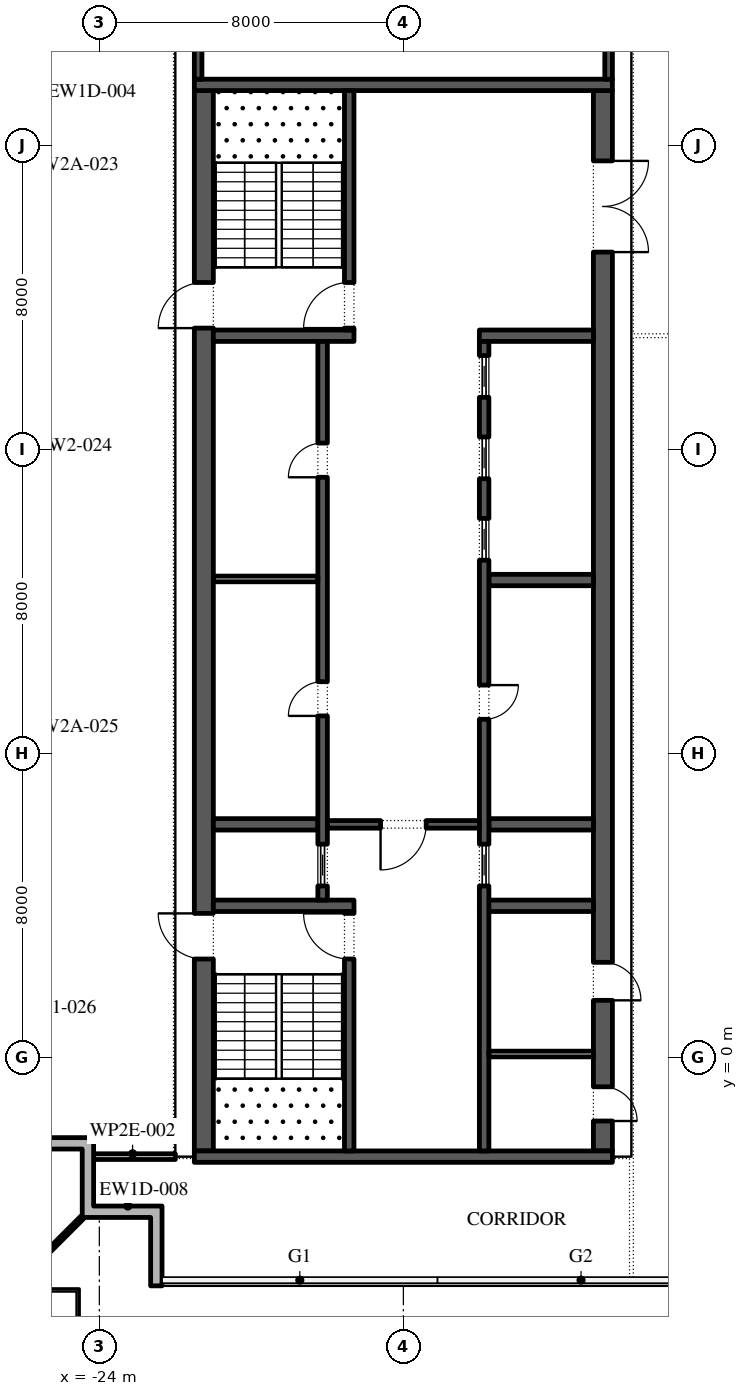
"""IFC4 building model, lengths in metres.
Left out: names, types, materials, properties, quantities, classifications, styles, units other than length and angle.
Written with IfcOpenShell. Run it as: python <this file> out.ifc"""

import sys

from ifc_helpers import new_model, si_unit, direction, frame, frame_2d, origin, place, context, subcontext, project, spatial, polyline, rectangle, outline, extrude, element, fill, save


model = new_model("IFC4")
c1 = context("Model", 3, precision=1e-05, world=origin(), true_north=direction((0.0, 1.0)))
c2 = subcontext(c1, "Body", "Model", "MODEL_VIEW")
j1 = project(units=[si_unit("LENGTHUNIT", "METRE"), si_unit("PLANEANGLEUNIT", "RADIAN")], contexts=[c1])
p1 = place(None, origin())
s1 = spatial("IfcSite", under=j1, at=p1, CompositionType="ELEMENT")
p2 = place(p1, origin())
s2 = spatial("IfcBuilding", under=s1, at=p2, CompositionType="ELEMENT")
p3 = place(p2, frame((0.0, 0.0, 359.4)))
s3 = spatial("IfcBuildingStorey", under=s2, at=p3, CompositionType="ELEMENT", Elevation=359.4)
p4 = place(p3, origin())
e1 = element("IfcWall", 1, at=p4, inside=s3, PredefinedType="STANDARD", context=c2, shape_type="SweptSolid", body=[
    extrude(outline(polyline([(-22.65, -4.2), (-24.45, -4.2), (-24.45, -2.4), (-25.95, -2.4), (-25.95, -2.1), (-24.15, -2.1), (-24.15, -3.9), (-22.35, -3.9), (-22.35, -6.0), (-22.65, -6.0), (-22.65, -4.2)])), origin(), (0.0, 0.0, 1.0), 3.9),
])
p5 = place(p3, frame((-24.45, -4.2, -0.05), z_axis=(0.0, 0.0, 1.0), x_axis=(-0.707106781187, -0.707106781187, 0.0)))
e2 = element("IfcWall", 2, at=p5, inside=s3, PredefinedType="STANDARD", context=c2, shape_type="SweptSolid", body=[
    extrude(rectangle(XDim=2.667, YDim=0.1, at=frame_2d((1.333, 0.0))), origin(), (0.0, 0.0, 1.0), 3.95),
])
p6 = place(p3, frame((-21.25, -2.45, 0.0), z_axis=(0.0, 0.0, 1.0), x_axis=(0.0, 1.0, 0.0)))
e3 = element("IfcWall", 3, at=p6, inside=s3, PredefinedType="SHEAR", context=c2, shape_type="SweptSolid", body=[
    extrude(rectangle(XDim=27.9, YDim=0.5, at=frame_2d((13.95, 0.0))), origin(), (0.0, 0.0, 1.0), 3.9),
])
p7 = place(p6, frame((5.05, 0.0, 0.0)))
e4 = element("IfcOpeningElement", 4, at=p7, cuts=e3, PredefinedType="OPENING", context=c2, shape_type="SweptSolid", body=[
    extrude(rectangle(XDim=1.2, YDim=2.1, at=frame_2d((0.6, 1.05))), frame((0.0, 0.26, 0.0), z_axis=(0.0, -1.0, 0.0), x_axis=(1.0, 0.0, 0.0)), (0.0, 0.0, 1.0), 0.52),
])
p8 = place(p6, frame((21.65, 0.0, 0.0)))
e5 = element("IfcOpeningElement", 5, at=p8, cuts=e3, PredefinedType="OPENING", context=c2, shape_type="SweptSolid", body=[
    extrude(rectangle(XDim=1.2, YDim=2.1, at=frame_2d((0.6, 1.05))), frame((0.0, 0.26, 0.0), z_axis=(0.0, -1.0, 0.0), x_axis=(1.0, 0.0, 0.0)), (0.0, 0.0, 1.0), 0.52),
])
p9 = place(p3, frame((-10.75, -2.45, 0.0), z_axis=(0.0, 0.0, 1.0), x_axis=(0.0, 1.0, 0.0)))
e6 = element("IfcWall", 6, at=p9, inside=s3, PredefinedType="SHEAR", context=c2, shape_type="SweptSolid", body=[
    extrude(rectangle(XDim=27.9, YDim=0.5, at=frame_2d((13.95, 0.0))), origin(), (0.0, 0.0, 1.0), 3.9),
])
p10 = place(p9, frame((23.65, 0.0, 0.0)))
e7 = element("IfcOpeningElement", 7, at=p10, cuts=e6, PredefinedType="OPENING", context=c2, shape_type="SweptSolid", body=[
    extrude(rectangle(XDim=2.4, YDim=2.1, at=frame_2d((1.2, 1.05))), frame((0.0, 0.26, 0.0), z_axis=(0.0, -1.0, 0.0), x_axis=(1.0, 0.0, 0.0)), (0.0, 0.0, 1.0), 0.52),
])
p11 = place(p9, frame((0.788, 0.0, 0.0)))
e8 = element("IfcOpeningElement", 8, at=p11, cuts=e6, PredefinedType="OPENING", context=c2, shape_type="SweptSolid", body=[
    extrude(rectangle(XDim=0.9, YDim=2.1, at=frame_2d((0.45, 1.05))), frame((0.0, 0.26, 0.0), z_axis=(0.0, -1.0, 0.0), x_axis=(1.0, 0.0, 0.0)), (0.0, 0.0, 1.0), 0.52),
])
p12 = place(p9, frame((3.962, 0.0, 0.0)))
e9 = element("IfcOpeningElement", 9, at=p12, cuts=e6, PredefinedType="OPENING", context=c2, shape_type="SweptSolid", body=[
    extrude(rectangle(XDim=1.0, YDim=2.1, at=frame_2d((0.5, 1.05))), frame((0.0, 0.26, 0.0), z_axis=(0.0, -1.0, 0.0), x_axis=(1.0, 0.0, 0.0)), (0.0, 0.0, 1.0), 0.52),
])
for number, where, z_axis, x_axis in (
    (10, (-21.5, -2.6, 0.0), (0.0, 0.0, 1.0), (1.0, 0.0, 0.0)),
    (11, (-21.5, 25.6, 0.0), (0.0, 0.0, 1.0), (1.0, 0.0, 0.0)),
):
    element("IfcWall", number, at=place(p3, frame(where, z_axis=z_axis, x_axis=x_axis)), inside=s3, PredefinedType="SHEAR", context=c2, shape_type="SweptSolid", body=[
        extrude(rectangle(XDim=11.0, YDim=0.3, at=frame_2d((5.5, 0.0))), origin(), (0.0, 0.0, 1.0), 3.9),
    ])
p13 = place(p3, frame((-21.0, 4.0, 0.0), z_axis=(0.0, 0.0, 1.0), x_axis=(1.0, 0.0, 0.0)))
e12 = element("IfcWall", 12, at=p13, inside=s3, PredefinedType="SHEAR", context=c2, shape_type="SweptSolid", body=[
    extrude(rectangle(XDim=3.7, YDim=0.3, at=frame_2d((1.85, 0.0))), origin(), (0.0, 0.0, 1.0), 3.9),
])
p14 = place(p3, frame((-17.425, -2.45, 0.0), z_axis=(0.0, 0.0, 1.0), x_axis=(0.0, 1.0, 0.0)))
e13 = element("IfcWall", 13, at=p14, inside=s3, PredefinedType="SHEAR", context=c2, shape_type="SweptSolid", body=[
    extrude(rectangle(XDim=6.3, YDim=0.25, at=frame_2d((3.15, 0.0))), origin(), (0.0, 0.0, 1.0), 3.9),
])
p15 = place(p14, frame((5.05, 0.0, 0.0)))
e14 = element("IfcOpeningElement", 14, at=p15, cuts=e13, PredefinedType="OPENING", context=c2, shape_type="SweptSolid", body=[
    extrude(rectangle(XDim=1.2, YDim=2.1, at=frame_2d((0.6, 1.05))), frame((0.0, 0.135, 0.0), z_axis=(0.0, -1.0, 0.0), x_axis=(1.0, 0.0, 0.0)), (0.0, 0.0, 1.0), 0.27),
])
p16 = place(p3, frame((-21.0, 19.0, 0.0), z_axis=(0.0, 0.0, 1.0), x_axis=(1.0, 0.0, 0.0)))
e15 = element("IfcWall", 15, at=p16, inside=s3, PredefinedType="SHEAR", context=c2, shape_type="SweptSolid", body=[
    extrude(rectangle(XDim=3.7, YDim=0.3, at=frame_2d((1.85, 0.0))), origin(), (0.0, 0.0, 1.0), 3.9),
])
p17 = place(p3, frame((-17.425, 19.15, 0.0), z_axis=(0.0, 0.0, 1.0), x_axis=(0.0, 1.0, 0.0)))
e16 = element("IfcWall", 16, at=p17, inside=s3, PredefinedType="SHEAR", context=c2, shape_type="SweptSolid", body=[
    extrude(rectangle(XDim=6.3, YDim=0.25, at=frame_2d((3.15, 0.0))), origin(), (0.0, 0.0, 1.0), 3.9),
])
p18 = place(p17, frame((0.05, 0.0, 0.0)))
e17 = element("IfcOpeningElement", 17, at=p18, cuts=e16, PredefinedType="OPENING", context=c2, shape_type="SweptSolid", body=[
    extrude(rectangle(XDim=1.2, YDim=2.1, at=frame_2d((0.6, 1.05))), frame((0.0, 0.135, 0.0), z_axis=(0.0, -1.0, 0.0), x_axis=(1.0, 0.0, 0.0)), (0.0, 0.0, 1.0), 0.27),
])
p19 = place(p3, frame((-21.0, 6.143, 0.0), z_axis=(0.0, 0.0, 1.0), x_axis=(1.0, 0.0, 0.0)))
e18 = element("IfcWall", 18, at=p19, inside=s3, PredefinedType="SHEAR", context=c2, shape_type="SweptSolid", body=[
    extrude(rectangle(XDim=2.75, YDim=0.3, at=frame_2d((1.375, 0.0))), origin(), (0.0, 0.0, 1.0), 3.9),
])
p20 = place(p3, frame((-18.125, 4.15, 0.0), z_axis=(0.0, 0.0, 1.0), x_axis=(0.0, 1.0, 0.0)))
e19 = element("IfcWall", 19, at=p20, inside=s3, PredefinedType="SHEAR", context=c2, shape_type="SweptSolid", body=[
    extrude(rectangle(XDim=14.7, YDim=0.25, at=frame_2d((7.35, 0.0))), origin(), (0.0, 0.0, 1.0), 3.9),
])
p21 = place(p20, frame((4.846, 0.0, 0.0)))
e20 = element("IfcOpeningElement", 20, at=p21, cuts=e19, PredefinedType="OPENING", context=c2, shape_type="SweptSolid", body=[
    extrude(rectangle(XDim=0.9, YDim=2.1, at=frame_2d((0.45, 1.05))), frame((0.0, 0.135, 0.0), z_axis=(0.0, -1.0, 0.0), x_axis=(1.0, 0.0, 0.0)), (0.0, 0.0, 1.0), 0.27),
])
p22 = place(p20, frame((11.125, 0.0, 0.0)))
e21 = element("IfcOpeningElement", 21, at=p22, cuts=e19, PredefinedType="OPENING", context=c2, shape_type="SweptSolid", body=[
    extrude(rectangle(XDim=0.9, YDim=2.1, at=frame_2d((0.45, 1.05))), frame((0.0, 0.135, 0.0), z_axis=(0.0, -1.0, 0.0), x_axis=(1.0, 0.0, 0.0)), (0.0, 0.0, 1.0), 0.27),
])
p23 = place(p20, frame((0.371, 0.0, 0.0)))
e22 = element("IfcOpeningElement", 22, at=p23, cuts=e19, PredefinedType="OPENING", context=c2, shape_type="SweptSolid", body=[
    extrude(rectangle(XDim=1.1, YDim=2.1, at=frame_2d((0.55, 1.05))), frame((0.0, 0.135, 0.0), z_axis=(0.0, -1.0, 0.0), x_axis=(1.0, 0.0, 0.0)), (0.0, 0.0, 1.0), 0.27),
])
p24 = place(p3, frame((-21.0, 12.6, 0.0), z_axis=(0.0, 0.0, 1.0), x_axis=(1.0, 0.0, 0.0)))
e23 = element("IfcWall", 23, at=p24, inside=s3, PredefinedType="PARTITIONING", context=c2, shape_type="SweptSolid", body=[
    extrude(rectangle(XDim=2.75, YDim=0.15, at=frame_2d((1.375, 0.0))), origin(), (0.0, 0.0, 1.0), 3.9),
])
p25 = place(p3, frame((-14.0, 4.0, 0.0), z_axis=(0.0, 0.0, 1.0), x_axis=(1.0, 0.0, 0.0)))
e24 = element("IfcWall", 24, at=p25, inside=s3, PredefinedType="SHEAR", context=c2, shape_type="SweptSolid", body=[
    extrude(rectangle(XDim=3.0, YDim=0.3, at=frame_2d((1.5, 0.0))), origin(), (0.0, 0.0, 1.0), 3.9),
])
for number, where, z_axis, x_axis in (
    (25, (-13.75, 6.143, 0.0), (0.0, 0.0, 1.0), (1.0, 0.0, 0.0)),
    (26, (-13.75, 12.571, 0.0), (0.0, 0.0, 1.0), (1.0, 0.0, 0.0)),
):
    element("IfcWall", number, at=place(p3, frame(where, z_axis=z_axis, x_axis=x_axis)), inside=s3, PredefinedType="SHEAR", context=c2, shape_type="SweptSolid", body=[
        extrude(rectangle(XDim=2.75, YDim=0.3, at=frame_2d((1.375, 0.0))), origin(), (0.0, 0.0, 1.0), 3.9),
    ])
p26 = place(p3, frame((-14.0, 19.0, 0.0), z_axis=(0.0, 0.0, 1.0), x_axis=(1.0, 0.0, 0.0)))
e27 = element("IfcWall", 27, at=p26, inside=s3, PredefinedType="SHEAR", context=c2, shape_type="SweptSolid", body=[
    extrude(rectangle(XDim=3.0, YDim=0.3, at=frame_2d((1.5, 0.0))), origin(), (0.0, 0.0, 1.0), 3.9),
])
p27 = place(p3, frame((-13.875, -2.45, 0.0), z_axis=(0.0, 0.0, 1.0), x_axis=(0.0, 1.0, 0.0)))
e28 = element("IfcWall", 28, at=p27, inside=s3, PredefinedType="SHEAR", context=c2, shape_type="SweptSolid", body=[
    extrude(rectangle(XDim=21.3, YDim=0.25, at=frame_2d((10.65, 0.0))), origin(), (0.0, 0.0, 1.0), 3.9),
])
p28 = place(p27, frame((11.357, 0.0, 0.0)))
e29 = element("IfcOpeningElement", 29, at=p28, cuts=e28, PredefinedType="OPENING", context=c2, shape_type="SweptSolid", body=[
    extrude(rectangle(XDim=0.9, YDim=2.1, at=frame_2d((0.45, 1.05))), frame((0.0, 0.135, 0.0), z_axis=(0.0, -1.0, 0.0), x_axis=(1.0, 0.0, 0.0)), (0.0, 0.0, 1.0), 0.27),
])
p29 = place(p27, frame((6.971, 0.0, 0.0)))
e30 = element("IfcOpeningElement", 30, at=p29, cuts=e28, PredefinedType="OPENING", context=c2, shape_type="SweptSolid", body=[
    extrude(rectangle(XDim=1.1, YDim=2.1, at=frame_2d((0.55, 1.05))), frame((0.0, 0.135, 0.0), z_axis=(0.0, -1.0, 0.0), x_axis=(1.0, 0.0, 0.0)), (0.0, 0.0, 1.0), 0.27),
])
p30 = place(p27, frame((15.543, 0.0, 0.0)))
e31 = element("IfcOpeningElement", 31, at=p30, cuts=e28, PredefinedType="OPENING", context=c2, shape_type="SweptSolid", body=[
    extrude(rectangle(XDim=1.1, YDim=2.1, at=frame_2d((0.55, 1.05))), frame((0.0, 0.135, 0.0), z_axis=(0.0, -1.0, 0.0), x_axis=(1.0, 0.0, 0.0)), (0.0, 0.0, 1.0), 0.27),
])
p31 = place(p27, frame((17.686, 0.0, 0.0)))
e32 = element("IfcOpeningElement", 32, at=p31, cuts=e28, PredefinedType="OPENING", context=c2, shape_type="SweptSolid", body=[
    extrude(rectangle(XDim=1.1, YDim=2.1, at=frame_2d((0.55, 1.05))), frame((0.0, 0.135, 0.0), z_axis=(0.0, -1.0, 0.0), x_axis=(1.0, 0.0, 0.0)), (0.0, 0.0, 1.0), 0.27),
])
p32 = place(p27, frame((19.829, 0.0, 0.0)))
e33 = element("IfcOpeningElement", 33, at=p32, cuts=e28, PredefinedType="OPENING", context=c2, shape_type="SweptSolid", body=[
    extrude(rectangle(XDim=1.1, YDim=2.1, at=frame_2d((0.55, 1.05))), frame((0.0, 0.135, 0.0), z_axis=(0.0, -1.0, 0.0), x_axis=(1.0, 0.0, 0.0)), (0.0, 0.0, 1.0), 0.27),
])
p33 = place(p3, frame((-18.0, 6.143, 0.0), z_axis=(0.0, 0.0, 1.0), x_axis=(1.0, 0.0, 0.0)))
e34 = element("IfcWall", 34, at=p33, inside=s3, PredefinedType="SHEAR", context=c2, shape_type="SweptSolid", body=[
    extrude(rectangle(XDim=4.0, YDim=0.2, at=frame_2d((2.0, 0.0))), origin(), (0.0, 0.0, 1.0), 3.9),
])
p34 = place(p33, frame((1.4, 0.0, 0.0)))
e35 = element("IfcOpeningElement", 35, at=p34, cuts=e34, PredefinedType="OPENING", context=c2, shape_type="SweptSolid", body=[
    extrude(rectangle(XDim=1.2, YDim=2.1, at=frame_2d((0.6, 1.05))), frame((0.0, 0.11, 0.0), z_axis=(0.0, -1.0, 0.0), x_axis=(1.0, 0.0, 0.0)), (0.0, 0.0, 1.0), 0.22),
])
p35 = place(p3, frame((-13.75, 0.1, 0.0), z_axis=(0.0, 0.0, 1.0), x_axis=(1.0, 0.0, 0.0)))
e36 = element("IfcWall", 36, at=p35, inside=s3, PredefinedType="PARTITIONING", context=c2, shape_type="SweptSolid", body=[
    extrude(rectangle(XDim=2.75, YDim=0.15, at=frame_2d((1.375, 0.0))), origin(), (0.0, 0.0, 1.0), 3.9),
])
p36 = place(p3, frame((-21.4, 25.75, 0.0), z_axis=(0.0, 0.0, 1.0), x_axis=(0.0, 1.0, 0.0)))
e37 = element("IfcWall", 37, at=p36, inside=s3, PredefinedType="SHEAR", context=c2, shape_type="SweptSolid", body=[
    extrude(rectangle(XDim=15.05, YDim=0.2, at=frame_2d((7.525, 0.0))), origin(), (0.0, 0.0, 1.0), 3.9),
])
p37 = place(p3, frame((-10.6, 25.75, 0.0), z_axis=(0.0, 0.0, 1.0), x_axis=(0.0, 1.0, 0.0)))
e38 = element("IfcWall", 38, at=p37, inside=s3, PredefinedType="SHEAR", context=c2, shape_type="SweptSolid", body=[
    extrude(rectangle(XDim=15.05, YDim=0.2, at=frame_2d((7.525, 0.0))), origin(), (0.0, 0.0, 1.0), 3.9),
])
p38 = place(p37, frame((7.075, 0.0, 0.0)))
e39 = element("IfcOpeningElement", 39, at=p38, cuts=e38, PredefinedType="OPENING", context=c2, shape_type="SweptSolid", body=[
    extrude(rectangle(XDim=0.9, YDim=2.1, at=frame_2d((0.45, 1.05))), frame((0.0, 0.11, 0.0), z_axis=(0.0, -1.0, 0.0), x_axis=(1.0, 0.0, 0.0)), (0.0, 0.0, 1.0), 0.22),
])
p39 = place(p3, frame((-24.25, -2.6, 0.0), z_axis=(0.0, 0.0, 1.0), x_axis=(1.0, 0.0, 0.0)))
e40 = element("IfcWall", 40, at=p39, inside=s3, PredefinedType="PARTITIONING", context=c2, shape_type="SweptSolid", body=[
    extrude(rectangle(XDim=2.25, YDim=0.15, at=frame_2d((1.125, 0.0))), origin(), (0.0, 0.0, 1.0), 3.9),
])
p40 = place(p21, origin())
e41 = element("IfcDoor", 41, at=p40, inside=s3, OperationType="SINGLE_SWING_RIGHT", PredefinedType="DOOR", context=c2, shape_type="SweptSolid", body=[
    extrude(rectangle(XDim=0.9, YDim=2.1, at=frame_2d((0.45, 1.05))), frame((0.0, 0.125, 0.0), z_axis=(0.0, -1.0, 0.0), x_axis=(1.0, 0.0, 0.0)), (0.0, 0.0, 1.0), 0.05),
])
fill(e20, e41)
p41 = place(p22, origin())
e42 = element("IfcDoor", 42, at=p41, inside=s3, OperationType="SINGLE_SWING_RIGHT", PredefinedType="DOOR", context=c2, shape_type="SweptSolid", body=[
    extrude(rectangle(XDim=0.9, YDim=2.1, at=frame_2d((0.45, 1.05))), frame((0.0, 0.125, 0.0), z_axis=(0.0, -1.0, 0.0), x_axis=(1.0, 0.0, 0.0)), (0.0, 0.0, 1.0), 0.05),
])
fill(e21, e42)
p42 = place(p23, origin())
e43 = element("IfcDoor", 43, at=p42, inside=s3, OperationType="SLIDING_TO_LEFT", PredefinedType="DOOR", context=c2, shape_type="SweptSolid", body=[
    extrude(rectangle(XDim=1.1, YDim=2.1, at=frame_2d((0.55, 1.05))), frame((0.0, 0.025, 0.0), z_axis=(0.0, -1.0, 0.0), x_axis=(1.0, 0.0, 0.0)), (0.0, 0.0, 1.0), 0.05),
])
fill(e22, e43)
p43 = place(p28, frame((0.9, -0.2, 0.0), z_axis=(0.0, 0.0, 1.0), x_axis=(-1.0, 0.0, 0.0)))
e44 = element("IfcDoor", 44, at=p43, inside=s3, OperationType="SINGLE_SWING_RIGHT", PredefinedType="DOOR", context=c2, shape_type="SweptSolid", body=[
    extrude(rectangle(XDim=0.9, YDim=2.1, at=frame_2d((0.45, 1.05))), frame((0.0, -0.075, 0.0), z_axis=(0.0, -1.0, 0.0), x_axis=(1.0, 0.0, 0.0)), (0.0, 0.0, 1.0), 0.05),
])
fill(e29, e44)
p44 = place(p29, origin())
e45 = element("IfcDoor", 45, at=p44, inside=s3, OperationType="SLIDING_TO_LEFT", PredefinedType="DOOR", context=c2, shape_type="SweptSolid", body=[
    extrude(rectangle(XDim=1.1, YDim=2.1, at=frame_2d((0.55, 1.05))), frame((0.0, 0.025, 0.0), z_axis=(0.0, -1.0, 0.0), x_axis=(1.0, 0.0, 0.0)), (0.0, 0.0, 1.0), 0.05),
])
fill(e30, e45)
p45 = place(p30, origin())
e46 = element("IfcDoor", 46, at=p45, inside=s3, OperationType="SLIDING_TO_LEFT", PredefinedType="DOOR", context=c2, shape_type="SweptSolid", body=[
    extrude(rectangle(XDim=1.1, YDim=2.1, at=frame_2d((0.55, 1.05))), frame((0.0, 0.025, 0.0), z_axis=(0.0, -1.0, 0.0), x_axis=(1.0, 0.0, 0.0)), (0.0, 0.0, 1.0), 0.05),
])
fill(e31, e46)
p46 = place(p31, origin())
e47 = element("IfcDoor", 47, at=p46, inside=s3, OperationType="SLIDING_TO_LEFT", PredefinedType="DOOR", context=c2, shape_type="SweptSolid", body=[
    extrude(rectangle(XDim=1.1, YDim=2.1, at=frame_2d((0.55, 1.05))), frame((0.0, 0.025, 0.0), z_axis=(0.0, -1.0, 0.0), x_axis=(1.0, 0.0, 0.0)), (0.0, 0.0, 1.0), 0.05),
])
fill(e32, e47)
p47 = place(p32, origin())
e48 = element("IfcDoor", 48, at=p47, inside=s3, OperationType="SLIDING_TO_LEFT", PredefinedType="DOOR", context=c2, shape_type="SweptSolid", body=[
    extrude(rectangle(XDim=1.1, YDim=2.1, at=frame_2d((0.55, 1.05))), frame((0.0, 0.025, 0.0), z_axis=(0.0, -1.0, 0.0), x_axis=(1.0, 0.0, 0.0)), (0.0, 0.0, 1.0), 0.05),
])
fill(e33, e48)
p48 = place(p34, frame((1.2, 0.0, 0.0), z_axis=(0.0, 0.0, 1.0), x_axis=(-1.0, 0.0, 0.0)))
e49 = element("IfcDoor", 49, at=p48, inside=s3, OperationType="SINGLE_SWING_LEFT", PredefinedType="DOOR", context=c2, shape_type="SweptSolid", body=[
    extrude(rectangle(XDim=1.2, YDim=2.1, at=frame_2d((0.6, 1.05))), frame((0.0, 0.025, 0.0), z_axis=(0.0, -1.0, 0.0), x_axis=(1.0, 0.0, 0.0)), (0.0, 0.0, 1.0), 0.05),
])
fill(e35, e49)
p49 = place(p10, frame((2.4, 0.0, 0.0), z_axis=(0.0, 0.0, 1.0), x_axis=(-1.0, 0.0, 0.0)))
e50 = element("IfcDoor", 50, at=p49, inside=s3, OperationType="DOUBLE_DOOR_SINGLE_SWING", PredefinedType="DOOR", context=c2, shape_type="SweptSolid", body=[
    extrude(rectangle(XDim=2.4, YDim=2.1, at=frame_2d((1.2, 1.05))), frame((0.0, 0.025, 0.0), z_axis=(0.0, -1.0, 0.0), x_axis=(1.0, 0.0, 0.0)), (0.0, 0.0, 1.0), 0.05),
])
fill(e7, e50)
p50 = place(p15, origin())
e51 = element("IfcDoor", 51, at=p50, inside=s3, OperationType="SINGLE_SWING_LEFT", PredefinedType="DOOR", context=c2, shape_type="SweptSolid", body=[
    extrude(rectangle(XDim=1.2, YDim=2.1, at=frame_2d((0.6, 1.05))), frame((0.0, 0.025, 0.0), z_axis=(0.0, -1.0, 0.0), x_axis=(1.0, 0.0, 0.0)), (0.0, 0.0, 1.0), 0.05),
])
fill(e14, e51)
p51 = place(p7, origin())
e52 = element("IfcDoor", 52, at=p51, inside=s3, OperationType="SINGLE_SWING_LEFT", PredefinedType="DOOR", context=c2, shape_type="SweptSolid", body=[
    extrude(rectangle(XDim=1.2, YDim=2.1, at=frame_2d((0.6, 1.05))), frame((0.0, 0.025, 0.0), z_axis=(0.0, -1.0, 0.0), x_axis=(1.0, 0.0, 0.0)), (0.0, 0.0, 1.0), 0.05),
])
fill(e4, e52)
p52 = place(p18, origin())
e53 = element("IfcDoor", 53, at=p52, inside=s3, OperationType="SINGLE_SWING_RIGHT", PredefinedType="DOOR", context=c2, shape_type="SweptSolid", body=[
    extrude(rectangle(XDim=1.2, YDim=2.1, at=frame_2d((0.6, 1.05))), frame((0.0, 0.025, 0.0), z_axis=(0.0, -1.0, 0.0), x_axis=(1.0, 0.0, 0.0)), (0.0, 0.0, 1.0), 0.05),
])
fill(e17, e53)
p53 = place(p8, origin())
e54 = element("IfcDoor", 54, at=p53, inside=s3, OperationType="SINGLE_SWING_RIGHT", PredefinedType="DOOR", context=c2, shape_type="SweptSolid", body=[
    extrude(rectangle(XDim=1.2, YDim=2.1, at=frame_2d((0.6, 1.05))), frame((0.0, 0.025, 0.0), z_axis=(0.0, -1.0, 0.0), x_axis=(1.0, 0.0, 0.0)), (0.0, 0.0, 1.0), 0.05),
])
fill(e5, e54)
p54 = place(p11, frame((0.9, 0.45, 0.0), z_axis=(0.0, 0.0, 1.0), x_axis=(-1.0, 0.0, 0.0)))
e55 = element("IfcDoor", 55, at=p54, inside=s3, OperationType="SINGLE_SWING_LEFT", PredefinedType="DOOR", context=c2, shape_type="SweptSolid", body=[
    extrude(rectangle(XDim=0.9, YDim=2.1, at=frame_2d((0.45, 1.05))), frame((0.0, 0.25, 0.0), z_axis=(0.0, -1.0, 0.0), x_axis=(1.0, 0.0, 0.0)), (0.0, 0.0, 1.0), 0.05),
])
fill(e8, e55)
p55 = place(p12, frame((1.0, 0.45, 0.0), z_axis=(0.0, 0.0, 1.0), x_axis=(-1.0, 0.0, 0.0)))
e56 = element("IfcDoor", 56, at=p55, inside=s3, OperationType="SINGLE_SWING_LEFT", PredefinedType="DOOR", context=c2, shape_type="SweptSolid", body=[
    extrude(rectangle(XDim=1.0, YDim=2.1, at=frame_2d((0.5, 1.05))), frame((0.0, 0.25, 0.0), z_axis=(0.0, -1.0, 0.0), x_axis=(1.0, 0.0, 0.0)), (0.0, 0.0, 1.0), 0.05),
])
fill(e9, e56)
save(model, sys.argv[1])
